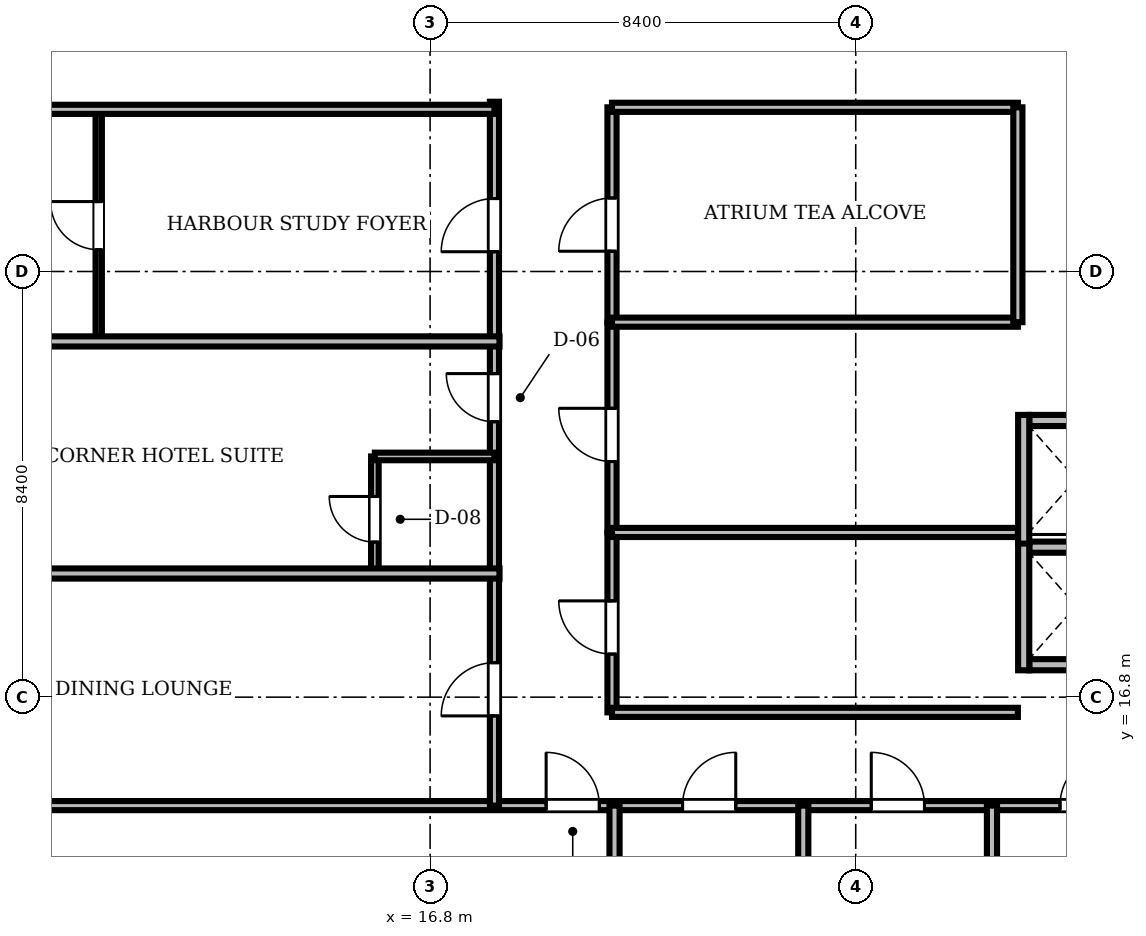
"""IFC4 building model, lengths in metres.
Left out: names, types, materials, properties, quantities, classifications, styles, units other than length and angle.
Written with IfcOpenShell. Run it as: python <this file> out.ifc"""

import sys

from ifc_helpers import new_model, si_unit, direction, frame, frame_2d, origin, place, context, subcontext, project, spatial, rectangle, extrude, source, transform, mapped, element, fill, save


model = new_model("IFC4")
c1 = context("Model", 3, precision=1e-05, world=origin(), true_north=direction((0.0, 1.0)))
c2 = subcontext(c1, "Body", "Model", "MODEL_VIEW")
j1 = project(units=[si_unit("LENGTHUNIT", "METRE"), si_unit("PLANEANGLEUNIT", "RADIAN")], contexts=[c1])
p1 = place(None, origin())
s1 = spatial("IfcSite", under=j1, at=p1, CompositionType="ELEMENT")
p2 = place(p1, origin())
s2 = spatial("IfcBuilding", under=s1, at=p2, CompositionType="ELEMENT")
p3 = place(p2, frame((0.0, 0.0, 89.65)))
s3 = spatial("IfcBuildingStorey", under=s2, at=p3, CompositionType="ELEMENT", Elevation=89.65)
m1 = source(origin(), c2, "Body", "SweptSolid", [
    extrude(rectangle(XDim=1.85, YDim=0.22, at=frame_2d((0.925, 0.0))), origin(), (0.0, 0.0, 1.0), 3.0),
])
for number, where, z_axis, x_axis in (
    (1, (28.625, 17.44, 0.0), (0.0, 0.0, 1.0), (1.0, 0.0, 0.0)),
    (2, (28.625, 19.76, 0.0), (0.0, 0.0, 1.0), (1.0, 0.0, 0.0)),
):
    element("IfcWall", number, at=place(p3, frame(where, z_axis=z_axis, x_axis=x_axis)), inside=s3, PredefinedType="SOLIDWALL", context=c2, shape_type="MappedRepresentation", body=[
        mapped(m1, transform((0.0, 0.0, 0.0), scale=1.0)),
    ])
m2 = source(origin(), c2, "Body", "SweptSolid", [
    extrude(rectangle(XDim=2.54, YDim=0.22, at=frame_2d((1.27, 0.0))), origin(), (0.0, 0.0, 1.0), 3.0),
])
p4 = place(p3, frame((28.515, 17.33, 0.0), z_axis=(0.0, 0.0, 1.0), x_axis=(0.0, 1.0, 0.0)))
e3 = element("IfcWall", 3, at=p4, inside=s3, PredefinedType="SOLIDWALL", context=c2, shape_type="MappedRepresentation", body=[
    mapped(m2, transform((0.0, 0.0, 0.0), scale=1.0)),
])
p5 = place(p3, frame((28.625, 22.26, 0.0), z_axis=(0.0, 0.0, 1.0), x_axis=(1.0, 0.0, 0.0)))
e4 = element("IfcWall", 4, at=p5, inside=s3, PredefinedType="SOLIDWALL", context=c2, shape_type="MappedRepresentation", body=[
    mapped(m1, transform((0.0, 0.0, 0.0), scale=1.0)),
])
p6 = place(p3, frame((28.515, 19.83, 0.0), z_axis=(0.0, 0.0, 1.0), x_axis=(0.0, 1.0, 0.0)))
e5 = element("IfcWall", 5, at=p6, inside=s3, PredefinedType="SOLIDWALL", context=c2, shape_type="MappedRepresentation", body=[
    mapped(m2, transform((0.0, 0.0, 0.0), scale=1.0)),
])
m3 = source(origin(), c2, "Body", "SweptSolid", [
    extrude(rectangle(XDim=46.156, YDim=0.18, at=frame_2d((23.078, 0.0))), origin(), (0.0, 0.0, 1.0), 2.276),
])
p7 = place(p3, frame((2.422, 14.66, 0.0), z_axis=(0.0, 0.0, 1.0), x_axis=(1.0, 0.0, 0.0)))
e6 = element("IfcWall", 6, at=p7, inside=s3, PredefinedType="PARTITIONING", context=c2, shape_type="MappedRepresentation", body=[
    mapped(m3, transform((0.0, 0.0, 0.0), scale=1.0)),
])
m4 = source(origin(), c2, "Body", "SweptSolid", [
    extrude(rectangle(XDim=1.05, YDim=2.2, at=frame_2d((0.525, 1.1))), frame((0.0, 0.1, 0.0), z_axis=(0.0, -1.0, 0.0), x_axis=(1.0, 0.0, 0.0)), (0.0, 0.0, 1.0), 0.2),
])
p8 = place(p7, frame((16.668, 0.0, 0.0)))
e7 = element("IfcOpeningElement", 7, at=p8, cuts=e6, PredefinedType="OPENING", context=c2, shape_type="MappedRepresentation", body=[
    mapped(m4, transform((0.0, 0.0, 0.0), scale=1.0)),
])
p9 = place(p7, frame((19.36, 0.0, 0.0)))
e8 = element("IfcOpeningElement", 8, at=p9, cuts=e6, PredefinedType="OPENING", context=c2, shape_type="MappedRepresentation", body=[
    mapped(m4, transform((0.0, 0.0, 0.0), scale=1.0)),
])
p10 = place(p7, frame((23.085, 0.0, 0.0)))
e9 = element("IfcOpeningElement", 9, at=p10, cuts=e6, PredefinedType="OPENING", context=c2, shape_type="MappedRepresentation", body=[
    mapped(m4, transform((0.0, 0.0, 0.0), scale=1.0)),
])
p11 = place(p7, frame((26.809, 0.0, 0.0)))
e10 = element("IfcOpeningElement", 10, at=p11, cuts=e6, PredefinedType="OPENING", context=c2, shape_type="MappedRepresentation", body=[
    mapped(m4, transform((0.0, 0.0, 0.0), scale=1.0)),
])
p12 = place(p7, frame((30.534, 0.0, 0.0)))
e11 = element("IfcOpeningElement", 11, at=p12, cuts=e6, PredefinedType="OPENING", context=c2, shape_type="MappedRepresentation", body=[
    mapped(m4, transform((0.0, 0.0, 0.0), scale=1.0)),
])
p13 = place(p7, frame((34.259, 0.0, 0.0)))
e12 = element("IfcOpeningElement", 12, at=p13, cuts=e6, PredefinedType="OPENING", context=c2, shape_type="MappedRepresentation", body=[
    mapped(m4, transform((0.0, 0.0, 0.0), scale=1.0)),
])
p14 = place(p7, frame((37.983, 0.0, 0.0)))
e13 = element("IfcOpeningElement", 13, at=p14, cuts=e6, PredefinedType="OPENING", context=c2, shape_type="MappedRepresentation", body=[
    mapped(m4, transform((0.0, 0.0, 0.0), scale=1.0)),
])
p15 = place(p7, frame((42.727, 0.0, 0.0)))
e14 = element("IfcOpeningElement", 14, at=p15, cuts=e6, PredefinedType="OPENING", context=c2, shape_type="MappedRepresentation", body=[
    mapped(m4, transform((0.0, 0.0, 0.0), scale=1.0)),
])
m5 = source(origin(), c2, "Body", "SweptSolid", [
    extrude(rectangle(XDim=13.89, YDim=0.18, at=frame_2d((6.945, 0.0))), origin(), (0.0, 0.0, 1.0), 2.442),
])
p16 = place(p3, frame((18.07, 14.66, 0.0), z_axis=(0.0, 0.0, 1.0), x_axis=(0.0, 1.0, 0.0)))
e15 = element("IfcWall", 15, at=p16, inside=s3, PredefinedType="PARTITIONING", context=c2, shape_type="MappedRepresentation", body=[
    mapped(m5, transform((0.0, 0.0, 0.0), scale=1.0)),
])
p17 = place(p16, frame((1.77, 0.0, 0.0)))
e16 = element("IfcOpeningElement", 16, at=p17, cuts=e15, PredefinedType="OPENING", context=c2, shape_type="MappedRepresentation", body=[
    mapped(m4, transform((0.0, 0.0, 0.0), scale=1.0)),
])
m6 = source(origin(), c2, "Body", "SweptSolid", [
    extrude(rectangle(XDim=0.95, YDim=2.15, at=frame_2d((0.475, 1.075))), frame((0.0, 0.1, 0.0), z_axis=(0.0, -1.0, 0.0), x_axis=(1.0, 0.0, 0.0)), (0.0, 0.0, 1.0), 0.2),
])
p18 = place(p16, frame((7.575, 0.0, 0.0)))
e17 = element("IfcOpeningElement", 17, at=p18, cuts=e15, PredefinedType="OPENING", context=c2, shape_type="MappedRepresentation", body=[
    mapped(m6, transform((0.0, 0.0, 0.0), scale=1.0)),
])
p19 = place(p16, frame((10.93, 0.0, 0.0)))
e18 = element("IfcOpeningElement", 18, at=p19, cuts=e15, PredefinedType="OPENING", context=c2, shape_type="MappedRepresentation", body=[
    mapped(m4, transform((0.0, 0.0, 0.0), scale=1.0)),
])
m7 = source(origin(), c2, "Body", "SweptSolid", [
    extrude(rectangle(XDim=4.58, YDim=0.125, at=frame_2d((2.29, 0.0))), origin(), (0.0, 0.0, 1.0), 2.442),
])
p20 = place(p3, frame((10.26, 23.82, 0.0), z_axis=(0.0, 0.0, 1.0), x_axis=(0.0, 1.0, 0.0)))
e19 = element("IfcWall", 19, at=p20, inside=s3, PredefinedType="PARTITIONING", context=c2, shape_type="MappedRepresentation", body=[
    mapped(m7, transform((0.0, 0.0, 0.0), scale=1.0)),
])
m8 = source(origin(), c2, "Body", "SweptSolid", [
    extrude(rectangle(XDim=0.95, YDim=2.15, at=frame_2d((0.475, 1.075))), frame((0.0, 0.073, 0.0), z_axis=(0.0, -1.0, 0.0), x_axis=(1.0, 0.0, 0.0)), (0.0, 0.0, 1.0), 0.145),
])
p21 = place(p20, frame((1.81, 0.0, 0.0)))
e20 = element("IfcOpeningElement", 20, at=p21, cuts=e19, PredefinedType="OPENING", context=c2, shape_type="MappedRepresentation", body=[
    mapped(m8, transform((0.0, 0.0, 0.0), scale=1.0)),
])
m9 = source(origin(), c2, "Body", "SweptSolid", [
    extrude(rectangle(XDim=4.24, YDim=0.18, at=frame_2d((2.12, 0.0))), origin(), (0.0, 0.0, 1.0), 2.442),
])
p22 = place(p3, frame((20.39, 24.2, 0.0), z_axis=(0.0, 0.0, 1.0), x_axis=(0.0, 1.0, 0.0)))
e21 = element("IfcWall", 21, at=p22, inside=s3, PredefinedType="PARTITIONING", context=c2, shape_type="MappedRepresentation", body=[
    mapped(m9, transform((0.0, 0.0, 0.0), scale=1.0)),
])
p23 = place(p22, frame((1.4, 0.0, 0.0)))
e22 = element("IfcOpeningElement", 22, at=p23, cuts=e21, PredefinedType="OPENING", context=c2, shape_type="MappedRepresentation", body=[
    mapped(m4, transform((0.0, 0.0, 0.0), scale=1.0)),
])
m10 = source(origin(), c2, "Body", "SweptSolid", [
    extrude(rectangle(XDim=4.15, YDim=0.18, at=frame_2d((2.075, 0.0))), origin(), (0.0, 0.0, 1.0), 2.632),
])
p24 = place(p3, frame((20.39, 20.05, 0.0), z_axis=(0.0, 0.0, 1.0), x_axis=(0.0, 1.0, 0.0)))
e23 = element("IfcWall", 23, at=p24, inside=s3, PredefinedType="PARTITIONING", context=c2, shape_type="MappedRepresentation", body=[
    mapped(m10, transform((0.0, 0.0, 0.0), scale=1.0)),
])
p25 = place(p24, frame((1.4, 0.0, 0.0)))
e24 = element("IfcOpeningElement", 24, at=p25, cuts=e23, PredefinedType="OPENING", context=c2, shape_type="MappedRepresentation", body=[
    mapped(m4, transform((0.0, 0.0, 0.0), scale=1.0)),
])
m11 = source(origin(), c2, "Body", "SweptSolid", [
    extrude(rectangle(XDim=3.55, YDim=0.18, at=frame_2d((1.775, 0.0))), origin(), (0.0, 0.0, 1.0), 2.442),
])
p26 = place(p3, frame((20.39, 16.5, 0.0), z_axis=(0.0, 0.0, 1.0), x_axis=(0.0, 1.0, 0.0)))
e25 = element("IfcWall", 25, at=p26, inside=s3, PredefinedType="PARTITIONING", context=c2, shape_type="MappedRepresentation", body=[
    mapped(m11, transform((0.0, 0.0, 0.0), scale=1.0)),
])
p27 = place(p26, frame((1.15, 0.0, 0.0)))
e26 = element("IfcOpeningElement", 26, at=p27, cuts=e25, PredefinedType="OPENING", context=c2, shape_type="MappedRepresentation", body=[
    mapped(m4, transform((0.0, 0.0, 0.0), scale=1.0)),
])
m12 = source(origin(), c2, "Body", "SweptSolid", [
    extrude(rectangle(XDim=2.29, YDim=0.15, at=frame_2d((1.145, 0.0))), origin(), (0.0, 0.0, 1.0), 2.442),
])
p28 = place(p3, frame((15.71, 19.26, 0.0), z_axis=(0.0, 0.0, 1.0), x_axis=(0.0, 1.0, 0.0)))
e27 = element("IfcWall", 27, at=p28, inside=s3, PredefinedType="PARTITIONING", context=c2, shape_type="MappedRepresentation", body=[
    mapped(m12, transform((0.0, 0.0, 0.0), scale=1.0)),
])
m13 = source(origin(), c2, "Body", "SweptSolid", [
    extrude(rectangle(XDim=0.9, YDim=2.1, at=frame_2d((0.45, 1.05))), frame((0.0, 0.085, 0.0), z_axis=(0.0, -1.0, 0.0), x_axis=(1.0, 0.0, 0.0)), (0.0, 0.0, 1.0), 0.17),
])
p29 = place(p28, frame((0.6, 0.0, 0.0)))
e28 = element("IfcOpeningElement", 28, at=p29, cuts=e27, PredefinedType="OPENING", context=c2, shape_type="MappedRepresentation", body=[
    mapped(m13, transform((0.0, 0.0, 0.0), scale=1.0)),
])
m14 = source(origin(), c2, "Body", "SweptSolid", [
    extrude(rectangle(XDim=15.748, YDim=0.2, at=frame_2d((7.874, 0.0))), origin(), (0.0, 0.0, 1.0), 2.276),
])
p30 = place(p3, frame((2.422, 19.24, 0.0), z_axis=(0.0, 0.0, 1.0), x_axis=(1.0, 0.0, 0.0)))
e29 = element("IfcWall", 29, at=p30, inside=s3, PredefinedType="PARTITIONING", context=c2, shape_type="MappedRepresentation", body=[
    mapped(m14, transform((0.0, 0.0, 0.0), scale=1.0)),
])
m15 = source(origin(), c2, "Body", "SweptSolid", [
    extrude(rectangle(XDim=15.94, YDim=0.2, at=frame_2d((7.97, 0.0))), origin(), (0.0, 0.0, 1.0), 2.276),
])
p31 = place(p3, frame((2.23, 23.82, 0.0), z_axis=(0.0, 0.0, 1.0), x_axis=(1.0, 0.0, 0.0)))
e30 = element("IfcWall", 30, at=p31, inside=s3, PredefinedType="PARTITIONING", context=c2, shape_type="MappedRepresentation", body=[
    mapped(m15, transform((0.0, 0.0, 0.0), scale=1.0)),
])
m16 = source(origin(), c2, "Body", "SweptSolid", [
    extrude(rectangle(XDim=15.84, YDim=0.18, at=frame_2d((7.92, 0.0))), origin(), (0.0, 0.0, 1.0), 2.276),
])
p32 = place(p3, frame((2.23, 28.4, 0.0), z_axis=(0.0, 0.0, 1.0), x_axis=(1.0, 0.0, 0.0)))
e31 = element("IfcWall", 31, at=p32, inside=s3, PredefinedType="PARTITIONING", context=c2, shape_type="MappedRepresentation", body=[
    mapped(m16, transform((0.0, 0.0, 0.0), scale=1.0)),
])
m17 = source(origin(), c2, "Body", "SweptSolid", [
    extrude(rectangle(XDim=12.538, YDim=0.2, at=frame_2d((6.269, 0.0))), origin(), (0.0, 0.0, 1.0), 2.276),
])
p33 = place(p3, frame((20.44, 2.122, 0.0), z_axis=(0.0, 0.0, 1.0), x_axis=(0.0, 1.0, 0.0)))
e32 = element("IfcWall", 32, at=p33, inside=s3, PredefinedType="PARTITIONING", context=c2, shape_type="MappedRepresentation", body=[
    mapped(m17, transform((0.0, 0.0, 0.0), scale=1.0)),
])
m18 = source(origin(), c2, "Body", "SweptSolid", [
    extrude(rectangle(XDim=12.73, YDim=0.2, at=frame_2d((6.365, 0.0))), origin(), (0.0, 0.0, 1.0), 2.276),
])
for number, where, z_axis, x_axis in (
    (33, (24.165, 1.93, 0.0), (0.0, 0.0, 1.0), (0.0, 1.0, 0.0)),
    (34, (27.889, 1.93, 0.0), (0.0, 0.0, 1.0), (0.0, 1.0, 0.0)),
):
    element("IfcWall", number, at=place(p3, frame(where, z_axis=z_axis, x_axis=x_axis)), inside=s3, PredefinedType="PARTITIONING", context=c2, shape_type="MappedRepresentation", body=[
        mapped(m18, transform((0.0, 0.0, 0.0), scale=1.0)),
    ])
m19 = source(origin(), c2, "Body", "SweptSolid", [
    extrude(rectangle(XDim=8.01, YDim=0.18, at=frame_2d((4.005, 0.0))), origin(), (0.0, 0.0, 1.0), 2.442),
])
p34 = place(p3, frame((20.39, 16.5, 0.0), z_axis=(0.0, 0.0, 1.0), x_axis=(1.0, 0.0, 0.0)))
e35 = element("IfcWall", 35, at=p34, inside=s3, PredefinedType="PARTITIONING", context=c2, shape_type="MappedRepresentation", body=[
    mapped(m19, transform((0.0, 0.0, 0.0), scale=1.0)),
])
m20 = source(origin(), c2, "Body", "SweptSolid", [
    extrude(rectangle(XDim=8.01, YDim=0.18, at=frame_2d((4.005, 0.0))), origin(), (0.0, 0.0, 1.0), 3.0),
])
for number, where, z_axis, x_axis in (
    (36, (20.39, 20.05, 0.0), (0.0, 0.0, 1.0), (1.0, 0.0, 0.0)),
    (37, (20.39, 24.2, 0.0), (0.0, 0.0, 1.0), (1.0, 0.0, 0.0)),
    (38, (20.39, 28.44, 0.0), (0.0, 0.0, 1.0), (1.0, 0.0, 0.0)),
):
    element("IfcWall", number, at=place(p3, frame(where, z_axis=z_axis, x_axis=x_axis)), inside=s3, PredefinedType="PARTITIONING", context=c2, shape_type="MappedRepresentation", body=[
        mapped(m20, transform((0.0, 0.0, 0.0), scale=1.0)),
    ])
p35 = place(p3, frame((28.4, 24.2, 0.0), z_axis=(0.0, 0.0, 1.0), x_axis=(0.0, 1.0, 0.0)))
e39 = element("IfcWall", 39, at=p35, inside=s3, PredefinedType="PARTITIONING", context=c2, shape_type="MappedRepresentation", body=[
    mapped(m9, transform((0.0, 0.0, 0.0), scale=1.0)),
])
m21 = source(origin(), c2, "Body", "SweptSolid", [
    extrude(rectangle(XDim=2.36, YDim=0.15, at=frame_2d((1.18, 0.0))), origin(), (0.0, 0.0, 1.0), 3.0),
])
p36 = place(p3, frame((15.71, 21.55, 0.0), z_axis=(0.0, 0.0, 1.0), x_axis=(1.0, 0.0, 0.0)))
e40 = element("IfcWall", 40, at=p36, inside=s3, PredefinedType="PARTITIONING", context=c2, shape_type="MappedRepresentation", body=[
    mapped(m21, transform((0.0, 0.0, 0.0), scale=1.0)),
])
m22 = source(origin(), c2, "Body", "SweptSolid", [
    extrude(rectangle(XDim=1.05, YDim=2.2, at=frame_2d((0.525, 1.1))), frame((0.0, 0.025, 0.0), z_axis=(0.0, -1.0, 0.0), x_axis=(1.0, 0.0, 0.0)), (0.0, 0.0, 1.0), 0.05),
])
p37 = place(p8, origin())
e41 = element("IfcDoor", 41, at=p37, inside=s3, OperationType="SINGLE_SWING_LEFT", PredefinedType="DOOR", context=c2, shape_type="MappedRepresentation", body=[
    mapped(m22, transform((0.0, 0.0, 0.0), scale=1.0)),
])
fill(e7, e41)
p38 = place(p9, origin())
e42 = element("IfcDoor", 42, at=p38, inside=s3, OperationType="SINGLE_SWING_RIGHT", PredefinedType="DOOR", context=c2, shape_type="MappedRepresentation", body=[
    mapped(m22, transform((0.0, 0.0, 0.0), scale=1.0)),
])
fill(e8, e42)
p39 = place(p10, origin())
e43 = element("IfcDoor", 43, at=p39, inside=s3, OperationType="SINGLE_SWING_LEFT", PredefinedType="DOOR", context=c2, shape_type="MappedRepresentation", body=[
    mapped(m22, transform((0.0, 0.0, 0.0), scale=1.0)),
])
fill(e9, e43)
p40 = place(p11, origin())
e44 = element("IfcDoor", 44, at=p40, inside=s3, OperationType="SINGLE_SWING_RIGHT", PredefinedType="DOOR", context=c2, shape_type="MappedRepresentation", body=[
    mapped(m22, transform((0.0, 0.0, 0.0), scale=1.0)),
])
fill(e10, e44)
p41 = place(p17, origin())
e45 = element("IfcDoor", 45, at=p41, inside=s3, OperationType="SINGLE_SWING_LEFT", PredefinedType="DOOR", context=c2, shape_type="MappedRepresentation", body=[
    mapped(m22, transform((0.0, 0.0, 0.0), scale=1.0)),
])
fill(e16, e45)
m23 = source(origin(), c2, "Body", "SweptSolid", [
    extrude(rectangle(XDim=0.95, YDim=2.15, at=frame_2d((0.475, 1.075))), frame((0.0, 0.025, 0.0), z_axis=(0.0, -1.0, 0.0), x_axis=(1.0, 0.0, 0.0)), (0.0, 0.0, 1.0), 0.05),
])
p42 = place(p18, origin())
e46 = element("IfcDoor", 46, at=p42, inside=s3, OperationType="SINGLE_SWING_RIGHT", PredefinedType="DOOR", context=c2, shape_type="MappedRepresentation", body=[
    mapped(m23, transform((0.0, 0.0, 0.0), scale=1.0)),
])
fill(e17, e46)
p43 = place(p19, origin())
e47 = element("IfcDoor", 47, at=p43, inside=s3, OperationType="SINGLE_SWING_LEFT", PredefinedType="DOOR", context=c2, shape_type="MappedRepresentation", body=[
    mapped(m22, transform((0.0, 0.0, 0.0), scale=1.0)),
])
fill(e18, e47)
p44 = place(p21, origin())
e48 = element("IfcDoor", 48, at=p44, inside=s3, OperationType="SINGLE_SWING_RIGHT", PredefinedType="DOOR", context=c2, shape_type="MappedRepresentation", body=[
    mapped(m23, transform((0.0, 0.0, 0.0), scale=1.0)),
])
fill(e20, e48)
p45 = place(p23, origin())
e49 = element("IfcDoor", 49, at=p45, inside=s3, OperationType="SINGLE_SWING_LEFT", PredefinedType="DOOR", context=c2, shape_type="MappedRepresentation", body=[
    mapped(m22, transform((0.0, 0.0, 0.0), scale=1.0)),
])
fill(e22, e49)
p46 = place(p25, origin())
e50 = element("IfcDoor", 50, at=p46, inside=s3, OperationType="SINGLE_SWING_RIGHT", PredefinedType="DOOR", context=c2, shape_type="MappedRepresentation", body=[
    mapped(m22, transform((0.0, 0.0, 0.0), scale=1.0)),
])
fill(e24, e50)
p47 = place(p27, origin())
e51 = element("IfcDoor", 51, at=p47, inside=s3, OperationType="SINGLE_SWING_RIGHT", PredefinedType="DOOR", context=c2, shape_type="MappedRepresentation", body=[
    mapped(m22, transform((0.0, 0.0, 0.0), scale=1.0)),
])
fill(e26, e51)
m24 = source(origin(), c2, "Body", "SweptSolid", [
    extrude(rectangle(XDim=0.9, YDim=2.1, at=frame_2d((0.45, 1.05))), frame((0.0, 0.025, 0.0), z_axis=(0.0, -1.0, 0.0), x_axis=(1.0, 0.0, 0.0)), (0.0, 0.0, 1.0), 0.05),
])
p48 = place(p29, origin())
e52 = element("IfcDoor", 52, at=p48, inside=s3, OperationType="SINGLE_SWING_RIGHT", PredefinedType="DOOR", context=c2, shape_type="MappedRepresentation", body=[
    mapped(m24, transform((0.0, 0.0, 0.0), scale=1.0)),
])
fill(e28, e52)
save(model, sys.argv[1])
